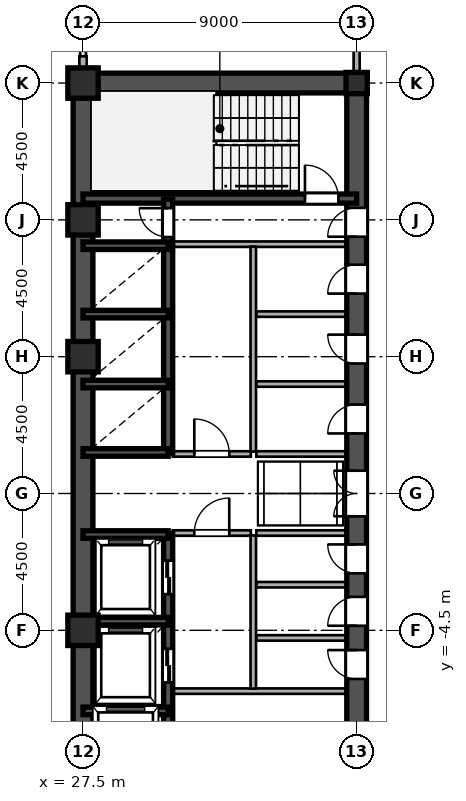
"""IFC4 building model, lengths in metres.
Left out: names, types, materials, properties, quantities, classifications, styles, units other than length and angle.
Written with IfcOpenShell. Run it as: python <this file> out.ifc"""

import sys

from ifc_helpers import new_model, si_unit, direction, frame, frame_2d, origin, origin_2d, place, context, subcontext, project, spatial, rectangle, hollow_rectangle, i_section, extrude, source, transform, mapped, element, fill, save


model = new_model("IFC4")
c1 = context("Model", 3, precision=1e-05, world=origin(), true_north=direction((0.0, 1.0)))
c2 = subcontext(c1, "Body", "Model", "MODEL_VIEW")
j1 = project(units=[si_unit("LENGTHUNIT", "METRE"), si_unit("PLANEANGLEUNIT", "RADIAN")], contexts=[c1])
p1 = place(None, origin())
s1 = spatial("IfcSite", under=j1, at=p1, CompositionType="ELEMENT")
p2 = place(p1, origin())
s2 = spatial("IfcBuilding", under=s1, at=p2, CompositionType="ELEMENT")
p3 = place(p2, frame((0.0, 0.0, 121.2)))
s3 = spatial("IfcBuildingStorey", under=s2, at=p3, CompositionType="ELEMENT", Elevation=121.2)
m1 = source(origin(), c2, "Body", "SweptSolid", [
    extrude(hollow_rectangle(XDim=1.0, YDim=1.0, WallThickness=0.042, at=origin_2d()), origin(), (0.0, 0.0, 1.0), 3.6),
])
for number, where, z_axis, x_axis in (
    (1, (27.5, -4.5, 0.0), (0.0, 0.0, 1.0), (1.0, 0.0, 0.0)),
    (2, (27.5, 4.5, 0.0), (0.0, 0.0, 1.0), (1.0, 0.0, 0.0)),
    (3, (27.5, 9.0, 0.0), (0.0, 0.0, 1.0), (1.0, 0.0, 0.0)),
    (4, (27.5, 13.5, 0.0), (0.0, 0.0, 1.0), (1.0, 0.0, 0.0)),
):
    element("IfcColumn", number, at=place(p3, frame(where, z_axis=z_axis, x_axis=x_axis)), inside=s3, PredefinedType="COLUMN", context=c2, shape_type="MappedRepresentation", body=[
        mapped(m1, transform((0.0, 0.0, 0.0), scale=1.0)),
    ])
m2 = source(origin(), c2, "Body", "SweptSolid", [
    extrude(i_section(OverallWidth=0.7, OverallDepth=0.7, WebThickness=0.028, FlangeThickness=0.045, at=origin_2d()), origin(), (0.0, 0.0, 1.0), 3.6),
])
p4 = place(p3, frame((36.5, 13.5, 0.0), z_axis=(0.0, 0.0, 1.0), x_axis=(1.0, 0.0, 0.0)))
e5 = element("IfcColumn", 5, at=p4, inside=s3, PredefinedType="COLUMN", context=c2, shape_type="MappedRepresentation", body=[
    mapped(m2, transform((0.0, 0.0, 0.0), scale=1.0)),
])
p5 = place(p3, frame((27.5, 13.83, 0.0), z_axis=(0.0, 0.0, 1.0), x_axis=(0.0, 1.0, 0.0)))
e6 = element("IfcWall", 6, at=p5, inside=s3, PredefinedType="SOLIDWALL", context=c2, shape_type="SweptSolid", body=[
    extrude(rectangle(XDim=0.55, YDim=0.24, at=frame_2d((0.275, 0.0))), origin(), (0.0, 0.0, 1.0), 2.88),
])
for number, where, z_axis, x_axis in (
    (7, (27.5, -13.5, 0.0), (0.0, 0.0, 1.0), (0.0, 1.0, 0.0)),
    (8, (27.5, 1.3, 0.0), (0.0, 0.0, 1.0), (0.0, 1.0, 0.0)),
):
    element("IfcWall", number, at=place(p3, frame(where, z_axis=z_axis, x_axis=x_axis)), inside=s3, PredefinedType="SHEAR", context=c2, shape_type="SweptSolid", body=[
        extrude(rectangle(XDim=12.2, YDim=0.65, at=frame_2d((6.1, 0.0))), origin(), (0.0, 0.0, 1.0), 3.38),
    ])
p6 = place(p3, frame((27.5, -1.3, 0.0), z_axis=(0.0, 0.0, 1.0), x_axis=(0.0, 1.0, 0.0)))
e9 = element("IfcWall", 9, at=p6, inside=s3, PredefinedType="SHEAR", context=c2, shape_type="SweptSolid", body=[
    extrude(rectangle(XDim=2.6, YDim=0.65, at=frame_2d((1.3, 0.0))), origin(), (0.0, 0.0, 1.0), 3.38),
])
p7 = place(p3, frame((27.5, 13.5, 0.0), z_axis=(0.0, 0.0, 1.0), x_axis=(1.0, 0.0, 0.0)))
e10 = element("IfcWall", 10, at=p7, inside=s3, PredefinedType="SHEAR", context=c2, shape_type="SweptSolid", body=[
    extrude(rectangle(XDim=9.0, YDim=0.65, at=frame_2d((4.5, 0.0))), origin(), (0.0, 0.0, 1.0), 3.38),
])
p8 = place(p3, frame((36.5, -13.65, 0.0), z_axis=(0.0, 0.0, 1.0), x_axis=(0.0, 1.0, 0.0)))
e11 = element("IfcWall", 11, at=p8, inside=s3, PredefinedType="SHEAR", context=c2, shape_type="SweptSolid", body=[
    extrude(rectangle(XDim=7.15, YDim=0.65, at=frame_2d((3.575, 0.0))), origin(), (0.0, 0.0, 1.0), 3.38),
])
p9 = place(p8, frame((4.675, 0.0, 0.0)))
e12 = element("IfcOpeningElement", 12, at=p9, cuts=e11, PredefinedType="OPENING", context=c2, shape_type="SweptSolid", body=[
    extrude(rectangle(XDim=1.15, YDim=2.2, at=frame_2d((0.575, 1.1))), frame((0.0, 0.335, 0.0), z_axis=(0.0, -1.0, 0.0), x_axis=(1.0, 0.0, 0.0)), (0.0, 0.0, 1.0), 0.67),
])
p10 = place(p3, frame((36.5, -1.3, 0.0), z_axis=(0.0, 0.0, 1.0), x_axis=(0.0, 1.0, 0.0)))
e13 = element("IfcWall", 13, at=p10, inside=s3, PredefinedType="SHEAR", context=c2, shape_type="SweptSolid", body=[
    extrude(rectangle(XDim=2.6, YDim=0.65, at=frame_2d((1.3, 0.0))), origin(), (0.0, 0.0, 1.0), 3.38),
])
p11 = place(p10, frame((0.55, 0.0, 0.0)))
e14 = element("IfcOpeningElement", 14, at=p11, cuts=e13, PredefinedType="OPENING", context=c2, shape_type="SweptSolid", body=[
    extrude(rectangle(XDim=1.5, YDim=2.3, at=frame_2d((0.75, 1.15))), frame((0.0, 0.335, 0.0), z_axis=(0.0, -1.0, 0.0), x_axis=(1.0, 0.0, 0.0)), (0.0, 0.0, 1.0), 0.67),
])
p12 = place(p3, frame((36.5, 8.2, 0.0), z_axis=(0.0, 0.0, 1.0), x_axis=(0.0, 1.0, 0.0)))
e15 = element("IfcWall", 15, at=p12, inside=s3, PredefinedType="SHEAR", context=c2, shape_type="SweptSolid", body=[
    extrude(rectangle(XDim=5.45, YDim=0.65, at=frame_2d((2.725, 0.0))), origin(), (0.0, 0.0, 1.0), 3.38),
])
p13 = place(p12, frame((0.245, 0.0, 0.0)))
e16 = element("IfcOpeningElement", 16, at=p13, cuts=e15, PredefinedType="OPENING", context=c2, shape_type="SweptSolid", body=[
    extrude(rectangle(XDim=0.95, YDim=2.15, at=frame_2d((0.475, 1.075))), frame((0.0, 0.335, 0.0), z_axis=(0.0, -1.0, 0.0), x_axis=(1.0, 0.0, 0.0)), (0.0, 0.0, 1.0), 0.67),
])
p14 = place(p3, frame((36.5, -6.5, 0.0), z_axis=(0.0, 0.0, 1.0), x_axis=(0.0, 1.0, 0.0)))
e17 = element("IfcWall", 17, at=p14, inside=s3, PredefinedType="SHEAR", context=c2, shape_type="SweptSolid", body=[
    extrude(rectangle(XDim=1.75, YDim=0.65, at=frame_2d((0.875, 0.0))), origin(), (0.0, 0.0, 1.0), 3.38),
])
p15 = place(p14, frame((0.4, 0.0, 0.0)))
e18 = element("IfcOpeningElement", 18, at=p15, cuts=e17, PredefinedType="OPENING", context=c2, shape_type="SweptSolid", body=[
    extrude(rectangle(XDim=0.95, YDim=2.15, at=frame_2d((0.475, 1.075))), frame((0.0, 0.335, 0.0), z_axis=(0.0, -1.0, 0.0), x_axis=(1.0, 0.0, 0.0)), (0.0, 0.0, 1.0), 0.67),
])
p16 = place(p3, frame((36.5, -4.75, 0.0), z_axis=(0.0, 0.0, 1.0), x_axis=(0.0, 1.0, 0.0)))
e19 = element("IfcWall", 19, at=p16, inside=s3, PredefinedType="SHEAR", context=c2, shape_type="SweptSolid", body=[
    extrude(rectangle(XDim=1.75, YDim=0.65, at=frame_2d((0.875, 0.0))), origin(), (0.0, 0.0, 1.0), 3.38),
])
p17 = place(p16, frame((0.4, 0.0, 0.0)))
e20 = element("IfcOpeningElement", 20, at=p17, cuts=e19, PredefinedType="OPENING", context=c2, shape_type="SweptSolid", body=[
    extrude(rectangle(XDim=0.95, YDim=2.15, at=frame_2d((0.475, 1.075))), frame((0.0, 0.335, 0.0), z_axis=(0.0, -1.0, 0.0), x_axis=(1.0, 0.0, 0.0)), (0.0, 0.0, 1.0), 0.67),
])
p18 = place(p3, frame((36.5, -3.0, 0.0), z_axis=(0.0, 0.0, 1.0), x_axis=(0.0, 1.0, 0.0)))
e21 = element("IfcWall", 21, at=p18, inside=s3, PredefinedType="SHEAR", context=c2, shape_type="SweptSolid", body=[
    extrude(rectangle(XDim=1.7, YDim=0.65, at=frame_2d((0.85, 0.0))), origin(), (0.0, 0.0, 1.0), 3.38),
])
p19 = place(p18, frame((0.375, 0.0, 0.0)))
e22 = element("IfcOpeningElement", 22, at=p19, cuts=e21, PredefinedType="OPENING", context=c2, shape_type="SweptSolid", body=[
    extrude(rectangle(XDim=0.95, YDim=2.15, at=frame_2d((0.475, 1.075))), frame((0.0, 0.335, 0.0), z_axis=(0.0, -1.0, 0.0), x_axis=(1.0, 0.0, 0.0)), (0.0, 0.0, 1.0), 0.67),
])
p20 = place(p3, frame((36.5, 1.3, 0.0), z_axis=(0.0, 0.0, 1.0), x_axis=(0.0, 1.0, 0.0)))
e23 = element("IfcWall", 23, at=p20, inside=s3, PredefinedType="SHEAR", context=c2, shape_type="SweptSolid", body=[
    extrude(rectangle(XDim=2.3, YDim=0.65, at=frame_2d((1.15, 0.0))), origin(), (0.0, 0.0, 1.0), 3.38),
])
p21 = place(p20, frame((0.675, 0.0, 0.0)))
e24 = element("IfcOpeningElement", 24, at=p21, cuts=e23, PredefinedType="OPENING", context=c2, shape_type="SweptSolid", body=[
    extrude(rectangle(XDim=0.95, YDim=2.15, at=frame_2d((0.475, 1.075))), frame((0.0, 0.335, 0.0), z_axis=(0.0, -1.0, 0.0), x_axis=(1.0, 0.0, 0.0)), (0.0, 0.0, 1.0), 0.67),
])
p22 = place(p3, frame((36.5, 3.6, 0.0), z_axis=(0.0, 0.0, 1.0), x_axis=(0.0, 1.0, 0.0)))
e25 = element("IfcWall", 25, at=p22, inside=s3, PredefinedType="SHEAR", context=c2, shape_type="SweptSolid", body=[
    extrude(rectangle(XDim=2.3, YDim=0.65, at=frame_2d((1.15, 0.0))), origin(), (0.0, 0.0, 1.0), 3.38),
])
p23 = place(p22, frame((0.675, 0.0, 0.0)))
e26 = element("IfcOpeningElement", 26, at=p23, cuts=e25, PredefinedType="OPENING", context=c2, shape_type="SweptSolid", body=[
    extrude(rectangle(XDim=0.95, YDim=2.15, at=frame_2d((0.475, 1.075))), frame((0.0, 0.335, 0.0), z_axis=(0.0, -1.0, 0.0), x_axis=(1.0, 0.0, 0.0)), (0.0, 0.0, 1.0), 0.67),
])
p24 = place(p3, frame((36.5, 5.9, 0.0), z_axis=(0.0, 0.0, 1.0), x_axis=(0.0, 1.0, 0.0)))
e27 = element("IfcWall", 27, at=p24, inside=s3, PredefinedType="SHEAR", context=c2, shape_type="SweptSolid", body=[
    extrude(rectangle(XDim=2.3, YDim=0.65, at=frame_2d((1.15, 0.0))), origin(), (0.0, 0.0, 1.0), 3.38),
])
p25 = place(p24, frame((0.675, 0.0, 0.0)))
e28 = element("IfcOpeningElement", 28, at=p25, cuts=e27, PredefinedType="OPENING", context=c2, shape_type="SweptSolid", body=[
    extrude(rectangle(XDim=0.95, YDim=2.15, at=frame_2d((0.475, 1.075))), frame((0.0, 0.335, 0.0), z_axis=(0.0, -1.0, 0.0), x_axis=(1.0, 0.0, 0.0)), (0.0, 0.0, 1.0), 0.67),
])
p26 = place(p3, frame((27.5, 9.7, 0.0), z_axis=(0.0, 0.0, 1.0), x_axis=(1.0, 0.0, 0.0)))
e29 = element("IfcWall", 29, at=p26, inside=s3, PredefinedType="SHEAR", context=c2, shape_type="SweptSolid", body=[
    extrude(rectangle(XDim=9.0, YDim=0.3, at=frame_2d((4.5, 0.0))), origin(), (0.0, 0.0, 1.0), 3.38),
])
p27 = place(p26, frame((7.3, 0.0, 0.0)))
e30 = element("IfcOpeningElement", 30, at=p27, cuts=e29, PredefinedType="OPENING", context=c2, shape_type="SweptSolid", body=[
    extrude(rectangle(XDim=1.1, YDim=2.2, at=frame_2d((0.55, 1.1))), frame((0.0, 0.16, 0.0), z_axis=(0.0, -1.0, 0.0), x_axis=(1.0, 0.0, 0.0)), (0.0, 0.0, 1.0), 0.32),
])
for number, where, z_axis, x_axis in (
    (31, (27.5, -7.15, 0.0), (0.0, 0.0, 1.0), (1.0, 0.0, 0.0)),
    (32, (27.5, -4.2, 0.0), (0.0, 0.0, 1.0), (1.0, 0.0, 0.0)),
    (33, (27.5, -1.35, 0.0), (0.0, 0.0, 1.0), (1.0, 0.0, 0.0)),
    (34, (27.5, 1.35, 0.0), (0.0, 0.0, 1.0), (1.0, 0.0, 0.0)),
    (35, (27.5, 3.6, 0.0), (0.0, 0.0, 1.0), (1.0, 0.0, 0.0)),
    (36, (27.5, 5.9, 0.0), (0.0, 0.0, 1.0), (1.0, 0.0, 0.0)),
    (37, (27.5, 8.15, 0.0), (0.0, 0.0, 1.0), (1.0, 0.0, 0.0)),
):
    element("IfcWall", number, at=place(p3, frame(where, z_axis=z_axis, x_axis=x_axis)), inside=s3, PredefinedType="SHEAR", context=c2, shape_type="SweptSolid", body=[
        extrude(rectangle(XDim=2.8, YDim=0.25, at=frame_2d((1.4, 0.0))), origin(), (0.0, 0.0, 1.0), 3.38),
    ])
p28 = place(p3, frame((30.3, -9.68, 0.0), z_axis=(0.0, 0.0, 1.0), x_axis=(0.0, 1.0, 0.0)))
e38 = element("IfcWall", 38, at=p28, inside=s3, PredefinedType="SHEAR", context=c2, shape_type="SweptSolid", body=[
    extrude(rectangle(XDim=2.56, YDim=0.3, at=frame_2d((1.28, 0.0))), origin(), (0.0, 0.0, 1.0), 3.38),
])
p29 = place(p28, frame((0.68, 0.0, 0.0)))
e39 = element("IfcOpeningElement", 39, at=p29, cuts=e38, PredefinedType="OPENING", context=c2, shape_type="SweptSolid", body=[
    extrude(rectangle(XDim=1.2, YDim=2.25, at=frame_2d((0.6, 1.125))), frame((0.0, 0.16, 0.0), z_axis=(0.0, -1.0, 0.0), x_axis=(1.0, 0.0, 0.0)), (0.0, 0.0, 1.0), 0.32),
])
p30 = place(p3, frame((30.3, -7.12, 0.0), z_axis=(0.0, 0.0, 1.0), x_axis=(0.0, 1.0, 0.0)))
e40 = element("IfcWall", 40, at=p30, inside=s3, PredefinedType="SHEAR", context=c2, shape_type="SweptSolid", body=[
    extrude(rectangle(XDim=2.92, YDim=0.3, at=frame_2d((1.46, 0.0))), origin(), (0.0, 0.0, 1.0), 3.38),
])
p31 = place(p30, frame((0.91, 0.0, 0.0)))
e41 = element("IfcOpeningElement", 41, at=p31, cuts=e40, PredefinedType="OPENING", context=c2, shape_type="SweptSolid", body=[
    extrude(rectangle(XDim=1.1, YDim=2.2, at=frame_2d((0.55, 1.1))), frame((0.0, 0.16, 0.0), z_axis=(0.0, -1.0, 0.0), x_axis=(1.0, 0.0, 0.0)), (0.0, 0.0, 1.0), 0.32),
])
p32 = place(p3, frame((30.3, -4.2, 0.0), z_axis=(0.0, 0.0, 1.0), x_axis=(0.0, 1.0, 0.0)))
e42 = element("IfcWall", 42, at=p32, inside=s3, PredefinedType="SHEAR", context=c2, shape_type="SweptSolid", body=[
    extrude(rectangle(XDim=2.88, YDim=0.3, at=frame_2d((1.44, 0.0))), origin(), (0.0, 0.0, 1.0), 3.38),
])
p33 = place(p32, frame((0.89, 0.0, 0.0)))
e43 = element("IfcOpeningElement", 43, at=p33, cuts=e42, PredefinedType="OPENING", context=c2, shape_type="SweptSolid", body=[
    extrude(rectangle(XDim=1.1, YDim=2.2, at=frame_2d((0.55, 1.1))), frame((0.0, 0.16, 0.0), z_axis=(0.0, -1.0, 0.0), x_axis=(1.0, 0.0, 0.0)), (0.0, 0.0, 1.0), 0.32),
])
p34 = place(p3, frame((30.3, 1.32, 0.0), z_axis=(0.0, 0.0, 1.0), x_axis=(0.0, 1.0, 0.0)))
e44 = element("IfcWall", 44, at=p34, inside=s3, PredefinedType="SHEAR", context=c2, shape_type="SweptSolid", body=[
    extrude(rectangle(XDim=2.28, YDim=0.3, at=frame_2d((1.14, 0.0))), origin(), (0.0, 0.0, 1.0), 3.38),
])
p35 = place(p3, frame((30.3, 3.6, 0.0), z_axis=(0.0, 0.0, 1.0), x_axis=(0.0, 1.0, 0.0)))
e45 = element("IfcWall", 45, at=p35, inside=s3, PredefinedType="SHEAR", context=c2, shape_type="SweptSolid", body=[
    extrude(rectangle(XDim=2.3, YDim=0.3, at=frame_2d((1.15, 0.0))), origin(), (0.0, 0.0, 1.0), 3.38),
])
p36 = place(p3, frame((30.3, 5.9, 0.0), z_axis=(0.0, 0.0, 1.0), x_axis=(0.0, 1.0, 0.0)))
e46 = element("IfcWall", 46, at=p36, inside=s3, PredefinedType="SHEAR", context=c2, shape_type="SweptSolid", body=[
    extrude(rectangle(XDim=2.25, YDim=0.3, at=frame_2d((1.125, 0.0))), origin(), (0.0, 0.0, 1.0), 3.38),
])
p37 = place(p3, frame((30.3, 8.15, 0.0), z_axis=(0.0, 0.0, 1.0), x_axis=(0.0, 1.0, 0.0)))
e47 = element("IfcWall", 47, at=p37, inside=s3, PredefinedType="SHEAR", context=c2, shape_type="SweptSolid", body=[
    extrude(rectangle(XDim=1.53, YDim=0.3, at=frame_2d((0.765, 0.0))), origin(), (0.0, 0.0, 1.0), 3.38),
])
p38 = place(p37, frame((0.285, 0.0, 0.0)))
e48 = element("IfcOpeningElement", 48, at=p38, cuts=e47, PredefinedType="OPENING", context=c2, shape_type="SweptSolid", body=[
    extrude(rectangle(XDim=0.95, YDim=2.15, at=frame_2d((0.475, 1.075))), frame((0.0, 0.16, 0.0), z_axis=(0.0, -1.0, 0.0), x_axis=(1.0, 0.0, 0.0)), (0.0, 0.0, 1.0), 0.32),
])
for number, where, z_axis, x_axis in (
    (49, (30.45, -6.5, 0.0), (0.0, 0.0, 1.0), (1.0, 0.0, 0.0)),
    (50, (30.45, 8.2, 0.0), (0.0, 0.0, 1.0), (1.0, 0.0, 0.0)),
):
    element("IfcWall", number, at=place(p3, frame(where, z_axis=z_axis, x_axis=x_axis)), inside=s3, PredefinedType="PARTITIONING", context=c2, shape_type="SweptSolid", body=[
        extrude(rectangle(XDim=5.7, YDim=0.18, at=frame_2d((2.85, 0.0))), origin(), (0.0, 0.0, 1.0), 3.38),
    ])
p39 = place(p3, frame((33.1, -6.42, 0.0), z_axis=(0.0, 0.0, 1.0), x_axis=(0.0, 1.0, 0.0)))
e51 = element("IfcWall", 51, at=p39, inside=s3, PredefinedType="PARTITIONING", context=c2, shape_type="SweptSolid", body=[
    extrude(rectangle(XDim=5.04, YDim=0.18, at=frame_2d((2.52, 0.0))), origin(), (0.0, 0.0, 1.0), 3.38),
])
p40 = place(p3, frame((33.1, 1.38, 0.0), z_axis=(0.0, 0.0, 1.0), x_axis=(0.0, 1.0, 0.0)))
e52 = element("IfcWall", 52, at=p40, inside=s3, PredefinedType="PARTITIONING", context=c2, shape_type="SweptSolid", body=[
    extrude(rectangle(XDim=6.74, YDim=0.18, at=frame_2d((3.37, 0.0))), origin(), (0.0, 0.0, 1.0), 3.38),
])
p41 = place(p3, frame((30.45, -1.3, 0.0), z_axis=(0.0, 0.0, 1.0), x_axis=(1.0, 0.0, 0.0)))
e53 = element("IfcWall", 53, at=p41, inside=s3, PredefinedType="PARTITIONING", context=c2, shape_type="SweptSolid", body=[
    extrude(rectangle(XDim=2.57, YDim=0.18, at=frame_2d((1.285, 0.0))), origin(), (0.0, 0.0, 1.0), 3.38),
])
p42 = place(p41, frame((0.71, 0.0, 0.0)))
e54 = element("IfcOpeningElement", 54, at=p42, cuts=e53, PredefinedType="OPENING", context=c2, shape_type="SweptSolid", body=[
    extrude(rectangle(XDim=1.15, YDim=2.2, at=frame_2d((0.575, 1.1))), frame((0.0, 0.1, 0.0), z_axis=(0.0, -1.0, 0.0), x_axis=(1.0, 0.0, 0.0)), (0.0, 0.0, 1.0), 0.2),
])
p43 = place(p3, frame((30.45, 1.3, 0.0), z_axis=(0.0, 0.0, 1.0), x_axis=(1.0, 0.0, 0.0)))
e55 = element("IfcWall", 55, at=p43, inside=s3, PredefinedType="PARTITIONING", context=c2, shape_type="SweptSolid", body=[
    extrude(rectangle(XDim=2.57, YDim=0.18, at=frame_2d((1.285, 0.0))), origin(), (0.0, 0.0, 1.0), 3.38),
])
p44 = place(p43, frame((0.71, 0.0, 0.0)))
e56 = element("IfcOpeningElement", 56, at=p44, cuts=e55, PredefinedType="OPENING", context=c2, shape_type="SweptSolid", body=[
    extrude(rectangle(XDim=1.15, YDim=2.2, at=frame_2d((0.575, 1.1))), frame((0.0, 0.1, 0.0), z_axis=(0.0, -1.0, 0.0), x_axis=(1.0, 0.0, 0.0)), (0.0, 0.0, 1.0), 0.2),
])
for number, where, z_axis, x_axis in (
    (57, (33.2, -1.3, 0.0), (0.0, 0.0, 1.0), (1.0, 0.0, 0.0)),
    (58, (33.2, 1.3, 0.0), (0.0, 0.0, 1.0), (1.0, 0.0, 0.0)),
    (59, (33.2, -4.75, 0.0), (0.0, 0.0, 1.0), (1.0, 0.0, 0.0)),
    (60, (33.2, -3.0, 0.0), (0.0, 0.0, 1.0), (1.0, 0.0, 0.0)),
    (61, (33.2, 3.6, 0.0), (0.0, 0.0, 1.0), (1.0, 0.0, 0.0)),
    (62, (33.2, 5.9, 0.0), (0.0, 0.0, 1.0), (1.0, 0.0, 0.0)),
):
    element("IfcWall", number, at=place(p3, frame(where, z_axis=z_axis, x_axis=x_axis)), inside=s3, PredefinedType="PARTITIONING", context=c2, shape_type="SweptSolid", body=[
        extrude(rectangle(XDim=2.95, YDim=0.18, at=frame_2d((1.475, 0.0))), origin(), (0.0, 0.0, 1.0), 3.38),
    ])
p45 = place(p3, frame((36.5, 13.83, 0.0), z_axis=(0.0, 0.0, 1.0), x_axis=(0.0, 1.0, 0.0)))
e63 = element("IfcWall", 63, at=p45, inside=s3, PredefinedType="PARTITIONING", context=c2, shape_type="SweptSolid", body=[
    extrude(rectangle(XDim=1.685, YDim=0.2, at=frame_2d((0.842, 0.0))), origin(), (0.0, 0.0, 1.0), 2.78),
])
m3 = source(origin(), c2, "Body", "SweptSolid", [
    extrude(rectangle(XDim=1.5, YDim=2.3, at=frame_2d((0.75, 1.15))), frame((0.0, 0.025, 0.0), z_axis=(0.0, -1.0, 0.0), x_axis=(1.0, 0.0, 0.0)), (0.0, 0.0, 1.0), 0.05),
])
p46 = place(p11, origin())
e64 = element("IfcDoor", 64, at=p46, inside=s3, OperationType="DOUBLE_SWING_LEFT", PredefinedType="DOOR", context=c2, shape_type="MappedRepresentation", body=[
    mapped(m3, transform((0.0, 0.0, 0.0), scale=1.0)),
])
fill(e14, e64)
m4 = source(origin(), c2, "Body", "SweptSolid", [
    extrude(rectangle(XDim=0.95, YDim=2.15, at=frame_2d((0.475, 1.075))), frame((0.0, 0.025, 0.0), z_axis=(0.0, -1.0, 0.0), x_axis=(1.0, 0.0, 0.0)), (0.0, 0.0, 1.0), 0.05),
])
p47 = place(p13, origin())
e65 = element("IfcDoor", 65, at=p47, inside=s3, OperationType="SINGLE_SWING_LEFT", PredefinedType="DOOR", context=c2, shape_type="MappedRepresentation", body=[
    mapped(m4, transform((0.0, 0.0, 0.0), scale=1.0)),
])
fill(e16, e65)
p48 = place(p15, origin())
e66 = element("IfcDoor", 66, at=p48, inside=s3, OperationType="SINGLE_SWING_RIGHT", PredefinedType="DOOR", context=c2, shape_type="MappedRepresentation", body=[
    mapped(m4, transform((0.0, 0.0, 0.0), scale=1.0)),
])
fill(e18, e66)
p49 = place(p17, origin())
e67 = element("IfcDoor", 67, at=p49, inside=s3, OperationType="SINGLE_SWING_LEFT", PredefinedType="DOOR", context=c2, shape_type="MappedRepresentation", body=[
    mapped(m4, transform((0.0, 0.0, 0.0), scale=1.0)),
])
fill(e20, e67)
p50 = place(p19, origin())
e68 = element("IfcDoor", 68, at=p50, inside=s3, OperationType="SINGLE_SWING_RIGHT", PredefinedType="DOOR", context=c2, shape_type="MappedRepresentation", body=[
    mapped(m4, transform((0.0, 0.0, 0.0), scale=1.0)),
])
fill(e22, e68)
p51 = place(p21, origin())
e69 = element("IfcDoor", 69, at=p51, inside=s3, OperationType="SINGLE_SWING_LEFT", PredefinedType="DOOR", context=c2, shape_type="MappedRepresentation", body=[
    mapped(m4, transform((0.0, 0.0, 0.0), scale=1.0)),
])
fill(e24, e69)
p52 = place(p23, origin())
e70 = element("IfcDoor", 70, at=p52, inside=s3, OperationType="SINGLE_SWING_RIGHT", PredefinedType="DOOR", context=c2, shape_type="MappedRepresentation", body=[
    mapped(m4, transform((0.0, 0.0, 0.0), scale=1.0)),
])
fill(e26, e70)
p53 = place(p25, origin())
e71 = element("IfcDoor", 71, at=p53, inside=s3, OperationType="SINGLE_SWING_LEFT", PredefinedType="DOOR", context=c2, shape_type="MappedRepresentation", body=[
    mapped(m4, transform((0.0, 0.0, 0.0), scale=1.0)),
])
fill(e28, e71)
m5 = source(origin(), c2, "Body", "SweptSolid", [
    extrude(rectangle(XDim=1.1, YDim=2.2, at=frame_2d((0.55, 1.1))), frame((0.0, 0.025, 0.0), z_axis=(0.0, -1.0, 0.0), x_axis=(1.0, 0.0, 0.0)), (0.0, 0.0, 1.0), 0.05),
])
p54 = place(p27, origin())
e72 = element("IfcDoor", 72, at=p54, inside=s3, OperationType="SINGLE_SWING_LEFT", PredefinedType="DOOR", context=c2, shape_type="MappedRepresentation", body=[
    mapped(m5, transform((0.0, 0.0, 0.0), scale=1.0)),
])
fill(e30, e72)
m6 = source(origin(), c2, "Body", "SweptSolid", [
    extrude(rectangle(XDim=1.1, YDim=2.2, at=frame_2d((0.55, 1.1))), frame((0.0, 0.025, 0.0), z_axis=(0.0, -1.0, 0.0), x_axis=(1.0, 0.0, 0.0)), (0.0, 0.0, 1.0), 0.05),
])
p55 = place(p31, origin())
e73 = element("IfcDoor", 73, at=p55, inside=s3, OperationType="DOUBLE_DOOR_SLIDING", PredefinedType="DOOR", context=c2, shape_type="MappedRepresentation", body=[
    mapped(m6, transform((0.0, 0.0, 0.0), scale=1.0)),
])
fill(e41, e73)
p56 = place(p33, origin())
e74 = element("IfcDoor", 74, at=p56, inside=s3, OperationType="DOUBLE_DOOR_SLIDING", PredefinedType="DOOR", context=c2, shape_type="MappedRepresentation", body=[
    mapped(m6, transform((0.0, 0.0, 0.0), scale=1.0)),
])
fill(e43, e74)
p57 = place(p38, origin())
e75 = element("IfcDoor", 75, at=p57, inside=s3, OperationType="SINGLE_SWING_RIGHT", PredefinedType="DOOR", context=c2, shape_type="MappedRepresentation", body=[
    mapped(m4, transform((0.0, 0.0, 0.0), scale=1.0)),
])
fill(e48, e75)
m7 = source(origin(), c2, "Body", "SweptSolid", [
    extrude(rectangle(XDim=1.15, YDim=2.2, at=frame_2d((0.575, 1.1))), frame((0.0, 0.025, 0.0), z_axis=(0.0, -1.0, 0.0), x_axis=(1.0, 0.0, 0.0)), (0.0, 0.0, 1.0), 0.05),
])
p58 = place(p42, origin())
e76 = element("IfcDoor", 76, at=p58, inside=s3, OperationType="SINGLE_SWING_RIGHT", PredefinedType="DOOR", context=c2, shape_type="MappedRepresentation", body=[
    mapped(m7, transform((0.0, 0.0, 0.0), scale=1.0)),
])
fill(e54, e76)
p59 = place(p44, origin())
e77 = element("IfcDoor", 77, at=p59, inside=s3, OperationType="SINGLE_SWING_LEFT", PredefinedType="DOOR", context=c2, shape_type="MappedRepresentation", body=[
    mapped(m7, transform((0.0, 0.0, 0.0), scale=1.0)),
])
fill(e56, e77)
save(model, sys.argv[1])
